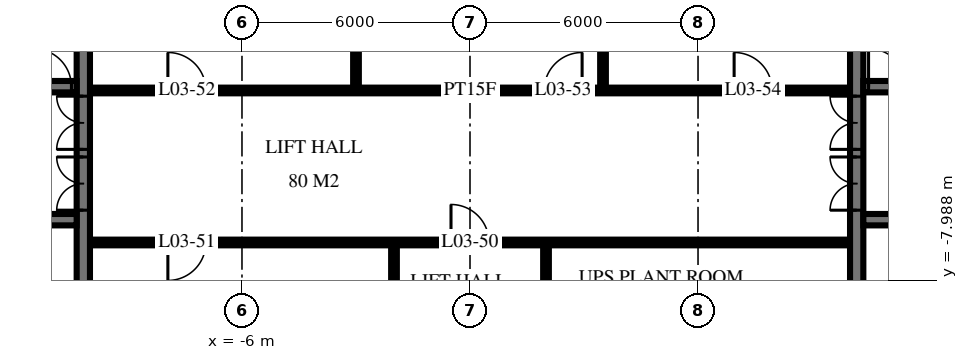
"""IFC4 building model, lengths in metres.
Left out: names, types, materials, properties, quantities, classifications, styles, units other than length and angle.
Written with IfcOpenShell. Run it as: python <this file> out.ifc"""

import sys

from ifc_helpers import new_model, si_unit, direction, frame, frame_2d, origin, place, context, subcontext, project, spatial, rectangle, extrude, element, fill, save


model = new_model("IFC4")
c1 = context("Model", 3, precision=1e-05, world=origin(), true_north=direction((0.0, 1.0)))
c2 = subcontext(c1, "Body", "Model", "MODEL_VIEW")
j1 = project(units=[si_unit("LENGTHUNIT", "METRE"), si_unit("PLANEANGLEUNIT", "RADIAN")], contexts=[c1])
p1 = place(None, origin())
s1 = spatial("IfcSite", under=j1, at=p1, CompositionType="ELEMENT")
p2 = place(p1, origin())
s2 = spatial("IfcBuilding", under=s1, at=p2, CompositionType="ELEMENT")
p3 = place(p2, frame((0.0, 0.0, 18.0)))
s3 = spatial("IfcBuildingStorey", under=s2, at=p3, CompositionType="ELEMENT", Elevation=18.0)
p4 = place(p3, frame((-10.175, -14.55, 0.0), z_axis=(0.0, 0.0, 1.0), x_axis=(0.0, 1.0, 0.0)))
e1 = element("IfcWall", 1, at=p4, inside=s3, PredefinedType="SHEAR", context=c2, shape_type="SweptSolid", body=[
    extrude(rectangle(XDim=14.1, YDim=0.35, at=frame_2d((7.05, 0.0))), origin(), (0.0, 0.0, 1.0), 6.0),
])
p5 = place(p4, frame((8.4, 0.0, 0.0)))
e2 = element("IfcOpeningElement", 2, at=p5, cuts=e1, PredefinedType="OPENING", context=c2, shape_type="SweptSolid", body=[
    extrude(rectangle(XDim=1.4, YDim=2.4, at=frame_2d((0.7, 1.2))), frame((0.0, 0.185, 0.0), z_axis=(0.0, -1.0, 0.0), x_axis=(1.0, 0.0, 0.0)), (0.0, 0.0, 1.0), 0.37),
])
p6 = place(p4, frame((10.0, 0.0, 0.0)))
e3 = element("IfcOpeningElement", 3, at=p6, cuts=e1, PredefinedType="OPENING", context=c2, shape_type="SweptSolid", body=[
    extrude(rectangle(XDim=1.4, YDim=2.4, at=frame_2d((0.7, 1.2))), frame((0.0, 0.185, 0.0), z_axis=(0.0, -1.0, 0.0), x_axis=(1.0, 0.0, 0.0)), (0.0, 0.0, 1.0), 0.37),
])
p7 = place(p4, frame((4.0, 0.0, 0.0)))
e4 = element("IfcOpeningElement", 4, at=p7, cuts=e1, PredefinedType="OPENING", context=c2, shape_type="SweptSolid", body=[
    extrude(rectangle(XDim=1.2, YDim=2.1, at=frame_2d((0.6, 1.05))), frame((0.0, 0.185, 0.0), z_axis=(0.0, -1.0, 0.0), x_axis=(1.0, 0.0, 0.0)), (0.0, 0.0, 1.0), 0.37),
])
p8 = place(p3, frame((-29.05, -2.9, 0.0), z_axis=(0.0, 0.0, 1.0), x_axis=(1.0, 0.0, 0.0)))
e5 = element("IfcWall", 5, at=p8, inside=s3, PredefinedType="SHEAR", context=c2, shape_type="SweptSolid", body=[
    extrude(rectangle(XDim=18.7, YDim=0.3, at=frame_2d((9.35, 0.0))), origin(), (0.0, 0.0, 1.0), 6.0),
])
p9 = place(p8, frame((2.95, 0.0, 0.0)))
e6 = element("IfcOpeningElement", 6, at=p9, cuts=e5, PredefinedType="OPENING", context=c2, shape_type="SweptSolid", body=[
    extrude(rectangle(XDim=1.1, YDim=2.1, at=frame_2d((0.55, 1.05))), frame((0.0, 0.16, 0.0), z_axis=(0.0, -1.0, 0.0), x_axis=(1.0, 0.0, 0.0)), (0.0, 0.0, 1.0), 0.32),
])
p10 = place(p8, frame((0.55, 0.0, 0.0)))
e7 = element("IfcOpeningElement", 7, at=p10, cuts=e5, PredefinedType="OPENING", context=c2, shape_type="SweptSolid", body=[
    extrude(rectangle(XDim=1.1, YDim=2.1, at=frame_2d((0.55, 1.05))), frame((0.0, 0.16, 0.0), z_axis=(0.0, -1.0, 0.0), x_axis=(1.0, 0.0, 0.0)), (0.0, 0.0, 1.0), 0.32),
])
p11 = place(p8, frame((11.613, 0.0, 0.0)))
e8 = element("IfcOpeningElement", 8, at=p11, cuts=e5, PredefinedType="OPENING", context=c2, shape_type="SweptSolid", body=[
    extrude(rectangle(XDim=0.9, YDim=2.1, at=frame_2d((0.45, 1.05))), frame((0.0, 0.16, 0.0), z_axis=(0.0, -1.0, 0.0), x_axis=(1.0, 0.0, 0.0)), (0.0, 0.0, 1.0), 0.32),
])
p12 = place(p8, frame((10.188, 0.0, 0.0)))
e9 = element("IfcOpeningElement", 9, at=p12, cuts=e5, PredefinedType="OPENING", context=c2, shape_type="SweptSolid", body=[
    extrude(rectangle(XDim=0.9, YDim=2.1, at=frame_2d((0.45, 1.05))), frame((0.0, 0.16, 0.0), z_axis=(0.0, -1.0, 0.0), x_axis=(1.0, 0.0, 0.0)), (0.0, 0.0, 1.0), 0.32),
])
p13 = place(p8, frame((17.562, 0.0, 0.0)))
e10 = element("IfcOpeningElement", 10, at=p13, cuts=e5, PredefinedType="OPENING", context=c2, shape_type="SweptSolid", body=[
    extrude(rectangle(XDim=1.0, YDim=2.1, at=frame_2d((0.5, 1.05))), frame((0.0, 0.16, 0.0), z_axis=(0.0, -1.0, 0.0), x_axis=(1.0, 0.0, 0.0)), (0.0, 0.0, 1.0), 0.32),
])
p14 = place(p8, frame((16.137, 0.0, 0.0)))
e11 = element("IfcOpeningElement", 11, at=p14, cuts=e5, PredefinedType="OPENING", context=c2, shape_type="SweptSolid", body=[
    extrude(rectangle(XDim=1.0, YDim=2.1, at=frame_2d((0.5, 1.05))), frame((0.0, 0.16, 0.0), z_axis=(0.0, -1.0, 0.0), x_axis=(1.0, 0.0, 0.0)), (0.0, 0.0, 1.0), 0.32),
])
p15 = place(p8, frame((13.85, 0.0, 0.0)))
e12 = element("IfcOpeningElement", 12, at=p15, cuts=e5, PredefinedType="OPENING", context=c2, shape_type="SweptSolid", body=[
    extrude(rectangle(XDim=1.0, YDim=2.1, at=frame_2d((0.5, 1.05))), frame((0.0, 0.16, 0.0), z_axis=(0.0, -1.0, 0.0), x_axis=(1.0, 0.0, 0.0)), (0.0, 0.0, 1.0), 0.32),
])
p16 = place(p8, frame((5.6, 0.0, 0.0)))
e13 = element("IfcOpeningElement", 13, at=p16, cuts=e5, PredefinedType="OPENING", context=c2, shape_type="SweptSolid", body=[
    extrude(rectangle(XDim=1.0, YDim=2.1, at=frame_2d((0.5, 1.05))), frame((0.0, 0.16, 0.0), z_axis=(0.0, -1.0, 0.0), x_axis=(1.0, 0.0, 0.0)), (0.0, 0.0, 1.0), 0.32),
])
p17 = place(p3, frame((-29.05, -6.4, 0.0), z_axis=(0.0, 0.0, 1.0), x_axis=(1.0, 0.0, 0.0)))
e14 = element("IfcWall", 14, at=p17, inside=s3, PredefinedType="SHEAR", context=c2, shape_type="SweptSolid", body=[
    extrude(rectangle(XDim=18.7, YDim=0.3, at=frame_2d((9.35, 0.0))), origin(), (0.0, 0.0, 1.0), 6.0),
])
p18 = place(p17, frame((2.95, 0.0, 0.0)))
e15 = element("IfcOpeningElement", 15, at=p18, cuts=e14, PredefinedType="OPENING", context=c2, shape_type="SweptSolid", body=[
    extrude(rectangle(XDim=1.1, YDim=2.1, at=frame_2d((0.55, 1.05))), frame((0.0, 0.16, 0.0), z_axis=(0.0, -1.0, 0.0), x_axis=(1.0, 0.0, 0.0)), (0.0, 0.0, 1.0), 0.32),
])
p19 = place(p17, frame((0.55, 0.0, 0.0)))
e16 = element("IfcOpeningElement", 16, at=p19, cuts=e14, PredefinedType="OPENING", context=c2, shape_type="SweptSolid", body=[
    extrude(rectangle(XDim=1.1, YDim=2.1, at=frame_2d((0.55, 1.05))), frame((0.0, 0.16, 0.0), z_axis=(0.0, -1.0, 0.0), x_axis=(1.0, 0.0, 0.0)), (0.0, 0.0, 1.0), 0.32),
])
p20 = place(p17, frame((10.8, 0.0, 0.0)))
e17 = element("IfcOpeningElement", 17, at=p20, cuts=e14, PredefinedType="OPENING", context=c2, shape_type="SweptSolid", body=[
    extrude(rectangle(XDim=1.1, YDim=2.1, at=frame_2d((0.55, 1.05))), frame((0.0, 0.16, 0.0), z_axis=(0.0, -1.0, 0.0), x_axis=(1.0, 0.0, 0.0)), (0.0, 0.0, 1.0), 0.32),
])
p21 = place(p17, frame((5.6, 0.0, 0.0)))
e18 = element("IfcOpeningElement", 18, at=p21, cuts=e14, PredefinedType="OPENING", context=c2, shape_type="SweptSolid", body=[
    extrude(rectangle(XDim=1.0, YDim=2.1, at=frame_2d((0.5, 1.05))), frame((0.0, 0.16, 0.0), z_axis=(0.0, -1.0, 0.0), x_axis=(1.0, 0.0, 0.0)), (0.0, 0.0, 1.0), 0.32),
])
p22 = place(p3, frame((10.175, -14.55, 0.0), z_axis=(0.0, 0.0, 1.0), x_axis=(0.0, 1.0, 0.0)))
e19 = element("IfcWall", 19, at=p22, inside=s3, PredefinedType="SHEAR", context=c2, shape_type="SweptSolid", body=[
    extrude(rectangle(XDim=14.1, YDim=0.35, at=frame_2d((7.05, 0.0))), origin(), (0.0, 0.0, 1.0), 6.0),
])
p23 = place(p22, frame((8.4, 0.0, 0.0)))
e20 = element("IfcOpeningElement", 20, at=p23, cuts=e19, PredefinedType="OPENING", context=c2, shape_type="SweptSolid", body=[
    extrude(rectangle(XDim=1.4, YDim=2.4, at=frame_2d((0.7, 1.2))), frame((0.0, 0.185, 0.0), z_axis=(0.0, -1.0, 0.0), x_axis=(1.0, 0.0, 0.0)), (0.0, 0.0, 1.0), 0.37),
])
p24 = place(p22, frame((10.0, 0.0, 0.0)))
e21 = element("IfcOpeningElement", 21, at=p24, cuts=e19, PredefinedType="OPENING", context=c2, shape_type="SweptSolid", body=[
    extrude(rectangle(XDim=1.4, YDim=2.4, at=frame_2d((0.7, 1.2))), frame((0.0, 0.185, 0.0), z_axis=(0.0, -1.0, 0.0), x_axis=(1.0, 0.0, 0.0)), (0.0, 0.0, 1.0), 0.37),
])
p25 = place(p22, frame((4.0, 0.0, 0.0)))
e22 = element("IfcOpeningElement", 22, at=p25, cuts=e19, PredefinedType="OPENING", context=c2, shape_type="SweptSolid", body=[
    extrude(rectangle(XDim=1.2, YDim=2.1, at=frame_2d((0.6, 1.05))), frame((0.0, 0.185, 0.0), z_axis=(0.0, -1.0, 0.0), x_axis=(1.0, 0.0, 0.0)), (0.0, 0.0, 1.0), 0.37),
])
p26 = place(p3, frame((10.35, -2.9, 0.0), z_axis=(0.0, 0.0, 1.0), x_axis=(1.0, 0.0, 0.0)))
e23 = element("IfcWall", 23, at=p26, inside=s3, PredefinedType="SHEAR", context=c2, shape_type="SweptSolid", body=[
    extrude(rectangle(XDim=18.7, YDim=0.3, at=frame_2d((9.35, 0.0))), origin(), (0.0, 0.0, 1.0), 6.0),
])
p27 = place(p26, frame((14.65, 0.0, 0.0)))
e24 = element("IfcOpeningElement", 24, at=p27, cuts=e23, PredefinedType="OPENING", context=c2, shape_type="SweptSolid", body=[
    extrude(rectangle(XDim=1.1, YDim=2.1, at=frame_2d((0.55, 1.05))), frame((0.0, 0.16, 0.0), z_axis=(0.0, -1.0, 0.0), x_axis=(1.0, 0.0, 0.0)), (0.0, 0.0, 1.0), 0.32),
])
p28 = place(p26, frame((17.05, 0.0, 0.0)))
e25 = element("IfcOpeningElement", 25, at=p28, cuts=e23, PredefinedType="OPENING", context=c2, shape_type="SweptSolid", body=[
    extrude(rectangle(XDim=1.1, YDim=2.1, at=frame_2d((0.55, 1.05))), frame((0.0, 0.16, 0.0), z_axis=(0.0, -1.0, 0.0), x_axis=(1.0, 0.0, 0.0)), (0.0, 0.0, 1.0), 0.32),
])
p29 = place(p26, frame((6.188, 0.0, 0.0)))
e26 = element("IfcOpeningElement", 26, at=p29, cuts=e23, PredefinedType="OPENING", context=c2, shape_type="SweptSolid", body=[
    extrude(rectangle(XDim=0.9, YDim=2.1, at=frame_2d((0.45, 1.05))), frame((0.0, 0.16, 0.0), z_axis=(0.0, -1.0, 0.0), x_axis=(1.0, 0.0, 0.0)), (0.0, 0.0, 1.0), 0.32),
])
p30 = place(p26, frame((7.613, 0.0, 0.0)))
e27 = element("IfcOpeningElement", 27, at=p30, cuts=e23, PredefinedType="OPENING", context=c2, shape_type="SweptSolid", body=[
    extrude(rectangle(XDim=0.9, YDim=2.1, at=frame_2d((0.45, 1.05))), frame((0.0, 0.16, 0.0), z_axis=(0.0, -1.0, 0.0), x_axis=(1.0, 0.0, 0.0)), (0.0, 0.0, 1.0), 0.32),
])
p31 = place(p26, frame((0.137, 0.0, 0.0)))
e28 = element("IfcOpeningElement", 28, at=p31, cuts=e23, PredefinedType="OPENING", context=c2, shape_type="SweptSolid", body=[
    extrude(rectangle(XDim=1.0, YDim=2.1, at=frame_2d((0.5, 1.05))), frame((0.0, 0.16, 0.0), z_axis=(0.0, -1.0, 0.0), x_axis=(1.0, 0.0, 0.0)), (0.0, 0.0, 1.0), 0.32),
])
p32 = place(p26, frame((1.562, 0.0, 0.0)))
e29 = element("IfcOpeningElement", 29, at=p32, cuts=e23, PredefinedType="OPENING", context=c2, shape_type="SweptSolid", body=[
    extrude(rectangle(XDim=1.0, YDim=2.1, at=frame_2d((0.5, 1.05))), frame((0.0, 0.16, 0.0), z_axis=(0.0, -1.0, 0.0), x_axis=(1.0, 0.0, 0.0)), (0.0, 0.0, 1.0), 0.32),
])
p33 = place(p26, frame((3.85, 0.0, 0.0)))
e30 = element("IfcOpeningElement", 30, at=p33, cuts=e23, PredefinedType="OPENING", context=c2, shape_type="SweptSolid", body=[
    extrude(rectangle(XDim=1.0, YDim=2.1, at=frame_2d((0.5, 1.05))), frame((0.0, 0.16, 0.0), z_axis=(0.0, -1.0, 0.0), x_axis=(1.0, 0.0, 0.0)), (0.0, 0.0, 1.0), 0.32),
])
p34 = place(p26, frame((12.1, 0.0, 0.0)))
e31 = element("IfcOpeningElement", 31, at=p34, cuts=e23, PredefinedType="OPENING", context=c2, shape_type="SweptSolid", body=[
    extrude(rectangle(XDim=1.0, YDim=2.1, at=frame_2d((0.5, 1.05))), frame((0.0, 0.16, 0.0), z_axis=(0.0, -1.0, 0.0), x_axis=(1.0, 0.0, 0.0)), (0.0, 0.0, 1.0), 0.32),
])
p35 = place(p3, frame((10.35, -6.4, 0.0), z_axis=(0.0, 0.0, 1.0), x_axis=(1.0, 0.0, 0.0)))
e32 = element("IfcWall", 32, at=p35, inside=s3, PredefinedType="SHEAR", context=c2, shape_type="SweptSolid", body=[
    extrude(rectangle(XDim=18.7, YDim=0.3, at=frame_2d((9.35, 0.0))), origin(), (0.0, 0.0, 1.0), 6.0),
])
p36 = place(p35, frame((14.65, 0.0, 0.0)))
e33 = element("IfcOpeningElement", 33, at=p36, cuts=e32, PredefinedType="OPENING", context=c2, shape_type="SweptSolid", body=[
    extrude(rectangle(XDim=1.1, YDim=2.1, at=frame_2d((0.55, 1.05))), frame((0.0, 0.16, 0.0), z_axis=(0.0, -1.0, 0.0), x_axis=(1.0, 0.0, 0.0)), (0.0, 0.0, 1.0), 0.32),
])
p37 = place(p35, frame((17.05, 0.0, 0.0)))
e34 = element("IfcOpeningElement", 34, at=p37, cuts=e32, PredefinedType="OPENING", context=c2, shape_type="SweptSolid", body=[
    extrude(rectangle(XDim=1.1, YDim=2.1, at=frame_2d((0.55, 1.05))), frame((0.0, 0.16, 0.0), z_axis=(0.0, -1.0, 0.0), x_axis=(1.0, 0.0, 0.0)), (0.0, 0.0, 1.0), 0.32),
])
p38 = place(p35, frame((6.8, 0.0, 0.0)))
e35 = element("IfcOpeningElement", 35, at=p38, cuts=e32, PredefinedType="OPENING", context=c2, shape_type="SweptSolid", body=[
    extrude(rectangle(XDim=1.1, YDim=2.1, at=frame_2d((0.55, 1.05))), frame((0.0, 0.16, 0.0), z_axis=(0.0, -1.0, 0.0), x_axis=(1.0, 0.0, 0.0)), (0.0, 0.0, 1.0), 0.32),
])
p39 = place(p35, frame((12.1, 0.0, 0.0)))
e36 = element("IfcOpeningElement", 36, at=p39, cuts=e32, PredefinedType="OPENING", context=c2, shape_type="SweptSolid", body=[
    extrude(rectangle(XDim=1.0, YDim=2.1, at=frame_2d((0.5, 1.05))), frame((0.0, 0.16, 0.0), z_axis=(0.0, -1.0, 0.0), x_axis=(1.0, 0.0, 0.0)), (0.0, 0.0, 1.0), 0.32),
])
p40 = place(p3, frame((3.5, -3.0, 0.0), z_axis=(0.0, 0.0, 1.0), x_axis=(0.0, 1.0, 0.0)))
e37 = element("IfcWall", 37, at=p40, inside=s3, PredefinedType="PARTITIONING", context=c2, shape_type="SweptSolid", body=[
    extrude(rectangle(XDim=3.312, YDim=0.15, at=frame_2d((1.656, 0.0))), origin(), (0.0, 0.0, 1.0), 5.55),
])
for number, where, z_axis, x_axis in (
    (38, (2.0, -11.0, 0.0), (0.0, 0.0, 1.0), (0.0, 1.0, 0.0)),
    (39, (-2.0, -11.0, 0.0), (0.0, 0.0, 1.0), (0.0, 1.0, 0.0)),
):
    element("IfcWall", number, at=place(p3, frame(where, z_axis=z_axis, x_axis=x_axis)), inside=s3, PredefinedType="PARTITIONING", context=c2, shape_type="SweptSolid", body=[
        extrude(rectangle(XDim=4.0, YDim=0.15, at=frame_2d((2.0, 0.0))), origin(), (0.0, 0.0, 1.0), 5.55),
    ])
p41 = place(p3, frame((-3.0, -3.0, 0.0), z_axis=(0.0, 0.0, 1.0), x_axis=(0.0, 1.0, 0.0)))
e40 = element("IfcWall", 40, at=p41, inside=s3, PredefinedType="PARTITIONING", context=c2, shape_type="SweptSolid", body=[
    extrude(rectangle(XDim=3.312, YDim=0.15, at=frame_2d((1.656, 0.0))), origin(), (0.0, 0.0, 1.0), 5.55),
])
p42 = place(p3, frame((-9.95, -7.0, 0.0), z_axis=(0.0, 0.0, 1.0), x_axis=(1.0, 0.0, 0.0)))
e41 = element("IfcWall", 41, at=p42, inside=s3, PredefinedType="PARTITIONING", context=c2, shape_type="SweptSolid", body=[
    extrude(rectangle(XDim=19.9, YDim=0.15, at=frame_2d((9.95, 0.0))), origin(), (0.0, 0.0, 1.0), 5.55),
])
p43 = place(p42, frame((9.45, 0.0, 0.0)))
e42 = element("IfcOpeningElement", 42, at=p43, cuts=e41, PredefinedType="OPENING", context=c2, shape_type="SweptSolid", body=[
    extrude(rectangle(XDim=1.0, YDim=2.1, at=frame_2d((0.5, 1.05))), frame((0.0, 0.085, 0.0), z_axis=(0.0, -1.0, 0.0), x_axis=(1.0, 0.0, 0.0)), (0.0, 0.0, 1.0), 0.17),
])
p44 = place(p42, frame((2.0, 0.0, 0.0)))
e43 = element("IfcOpeningElement", 43, at=p44, cuts=e41, PredefinedType="OPENING", context=c2, shape_type="SweptSolid", body=[
    extrude(rectangle(XDim=1.0, YDim=2.1, at=frame_2d((0.5, 1.05))), frame((0.0, 0.085, 0.0), z_axis=(0.0, -1.0, 0.0), x_axis=(1.0, 0.0, 0.0)), (0.0, 0.0, 1.0), 0.17),
])
p45 = place(p3, frame((-9.95, -3.0, 0.0), z_axis=(0.0, 0.0, 1.0), x_axis=(1.0, 0.0, 0.0)))
e44 = element("IfcWall", 44, at=p45, inside=s3, PredefinedType="PARTITIONING", context=c2, shape_type="SweptSolid", body=[
    extrude(rectangle(XDim=19.9, YDim=0.15, at=frame_2d((9.95, 0.0))), origin(), (0.0, 0.0, 1.0), 5.55),
])
p46 = place(p45, frame((2.0, 0.0, 0.0)))
e45 = element("IfcOpeningElement", 45, at=p46, cuts=e44, PredefinedType="OPENING", context=c2, shape_type="SweptSolid", body=[
    extrude(rectangle(XDim=1.0, YDim=2.1, at=frame_2d((0.5, 1.05))), frame((0.0, 0.085, 0.0), z_axis=(0.0, -1.0, 0.0), x_axis=(1.0, 0.0, 0.0)), (0.0, 0.0, 1.0), 0.17),
])
p47 = place(p45, frame((11.9, 0.0, 0.0)))
e46 = element("IfcOpeningElement", 46, at=p47, cuts=e44, PredefinedType="OPENING", context=c2, shape_type="SweptSolid", body=[
    extrude(rectangle(XDim=1.0, YDim=2.1, at=frame_2d((0.5, 1.05))), frame((0.0, 0.085, 0.0), z_axis=(0.0, -1.0, 0.0), x_axis=(1.0, 0.0, 0.0)), (0.0, 0.0, 1.0), 0.17),
])
p48 = place(p45, frame((16.9, 0.0, 0.0)))
e47 = element("IfcOpeningElement", 47, at=p48, cuts=e44, PredefinedType="OPENING", context=c2, shape_type="SweptSolid", body=[
    extrude(rectangle(XDim=1.0, YDim=2.1, at=frame_2d((0.5, 1.05))), frame((0.0, 0.085, 0.0), z_axis=(0.0, -1.0, 0.0), x_axis=(1.0, 0.0, 0.0)), (0.0, 0.0, 1.0), 0.17),
])
p49 = place(p5, origin())
e48 = element("IfcDoor", 48, at=p49, inside=s3, OperationType="DOUBLE_DOOR_SINGLE_SWING", PredefinedType="DOOR", context=c2, shape_type="SweptSolid", body=[
    extrude(rectangle(XDim=1.4, YDim=2.4, at=frame_2d((0.7, 1.2))), frame((0.0, 0.025, 0.0), z_axis=(0.0, -1.0, 0.0), x_axis=(1.0, 0.0, 0.0)), (0.0, 0.0, 1.0), 0.05),
])
fill(e2, e48)
p50 = place(p6, origin())
e49 = element("IfcDoor", 49, at=p50, inside=s3, OperationType="DOUBLE_DOOR_SINGLE_SWING", PredefinedType="DOOR", context=c2, shape_type="SweptSolid", body=[
    extrude(rectangle(XDim=1.4, YDim=2.4, at=frame_2d((0.7, 1.2))), frame((0.0, 0.025, 0.0), z_axis=(0.0, -1.0, 0.0), x_axis=(1.0, 0.0, 0.0)), (0.0, 0.0, 1.0), 0.05),
])
fill(e3, e49)
p51 = place(p13, origin())
e50 = element("IfcDoor", 50, at=p51, inside=s3, OperationType="SINGLE_SWING_RIGHT", PredefinedType="DOOR", context=c2, shape_type="SweptSolid", body=[
    extrude(rectangle(XDim=1.0, YDim=2.1, at=frame_2d((0.5, 1.05))), frame((0.0, 0.025, 0.0), z_axis=(0.0, -1.0, 0.0), x_axis=(1.0, 0.0, 0.0)), (0.0, 0.0, 1.0), 0.05),
])
fill(e10, e50)
p52 = place(p23, origin())
e51 = element("IfcDoor", 51, at=p52, inside=s3, OperationType="DOUBLE_DOOR_SINGLE_SWING", PredefinedType="DOOR", context=c2, shape_type="SweptSolid", body=[
    extrude(rectangle(XDim=1.4, YDim=2.4, at=frame_2d((0.7, 1.2))), frame((0.0, 0.025, 0.0), z_axis=(0.0, -1.0, 0.0), x_axis=(1.0, 0.0, 0.0)), (0.0, 0.0, 1.0), 0.05),
])
fill(e20, e51)
p53 = place(p24, origin())
e52 = element("IfcDoor", 52, at=p53, inside=s3, OperationType="DOUBLE_DOOR_SINGLE_SWING", PredefinedType="DOOR", context=c2, shape_type="SweptSolid", body=[
    extrude(rectangle(XDim=1.4, YDim=2.4, at=frame_2d((0.7, 1.2))), frame((0.0, 0.025, 0.0), z_axis=(0.0, -1.0, 0.0), x_axis=(1.0, 0.0, 0.0)), (0.0, 0.0, 1.0), 0.05),
])
fill(e21, e52)
p54 = place(p31, origin())
e53 = element("IfcDoor", 53, at=p54, inside=s3, OperationType="SINGLE_SWING_RIGHT", PredefinedType="DOOR", context=c2, shape_type="SweptSolid", body=[
    extrude(rectangle(XDim=1.0, YDim=2.1, at=frame_2d((0.5, 1.05))), frame((0.0, 0.025, 0.0), z_axis=(0.0, -1.0, 0.0), x_axis=(1.0, 0.0, 0.0)), (0.0, 0.0, 1.0), 0.05),
])
fill(e28, e53)
p55 = place(p43, origin())
e54 = element("IfcDoor", 54, at=p55, inside=s3, OperationType="SINGLE_SWING_RIGHT", PredefinedType="DOOR", context=c2, shape_type="SweptSolid", body=[
    extrude(rectangle(XDim=1.0, YDim=2.1, at=frame_2d((0.5, 1.05))), frame((0.0, 0.025, 0.0), z_axis=(0.0, -1.0, 0.0), x_axis=(1.0, 0.0, 0.0)), (0.0, 0.0, 1.0), 0.05),
])
fill(e42, e54)
p56 = place(p44, frame((0.5, 0.0, 0.0), z_axis=(0.0, 0.0, 1.0), x_axis=(-1.0, 0.0, 0.0)))
e55 = element("IfcDoor", 55, at=p56, inside=s3, OperationType="SINGLE_SWING_LEFT", PredefinedType="DOOR", context=c2, shape_type="SweptSolid", body=[
    extrude(rectangle(XDim=1.0, YDim=2.1, at=frame_2d((0.0, 1.05))), frame((0.0, -0.025, 0.0), z_axis=(0.0, 1.0, 0.0), x_axis=(-1.0, 0.0, 0.0)), (0.0, 0.0, 1.0), 0.05),
])
fill(e43, e55)
p57 = place(p46, origin())
e56 = element("IfcDoor", 56, at=p57, inside=s3, OperationType="SINGLE_SWING_RIGHT", PredefinedType="DOOR", context=c2, shape_type="SweptSolid", body=[
    extrude(rectangle(XDim=1.0, YDim=2.1, at=frame_2d((0.5, 1.05))), frame((0.0, 0.025, 0.0), z_axis=(0.0, -1.0, 0.0), x_axis=(1.0, 0.0, 0.0)), (0.0, 0.0, 1.0), 0.05),
])
fill(e45, e56)
p58 = place(p47, origin())
e57 = element("IfcDoor", 57, at=p58, inside=s3, OperationType="SINGLE_SWING_LEFT", PredefinedType="DOOR", context=c2, shape_type="SweptSolid", body=[
    extrude(rectangle(XDim=1.0, YDim=2.1, at=frame_2d((0.5, 1.05))), frame((0.0, 0.025, 0.0), z_axis=(0.0, -1.0, 0.0), x_axis=(1.0, 0.0, 0.0)), (0.0, 0.0, 1.0), 0.05),
])
fill(e46, e57)
p59 = place(p48, origin())
e58 = element("IfcDoor", 58, at=p59, inside=s3, OperationType="SINGLE_SWING_RIGHT", PredefinedType="DOOR", context=c2, shape_type="SweptSolid", body=[
    extrude(rectangle(XDim=1.0, YDim=2.1, at=frame_2d((0.5, 1.05))), frame((0.0, 0.025, 0.0), z_axis=(0.0, -1.0, 0.0), x_axis=(1.0, 0.0, 0.0)), (0.0, 0.0, 1.0), 0.05),
])
fill(e47, e58)
save(model, sys.argv[1])
